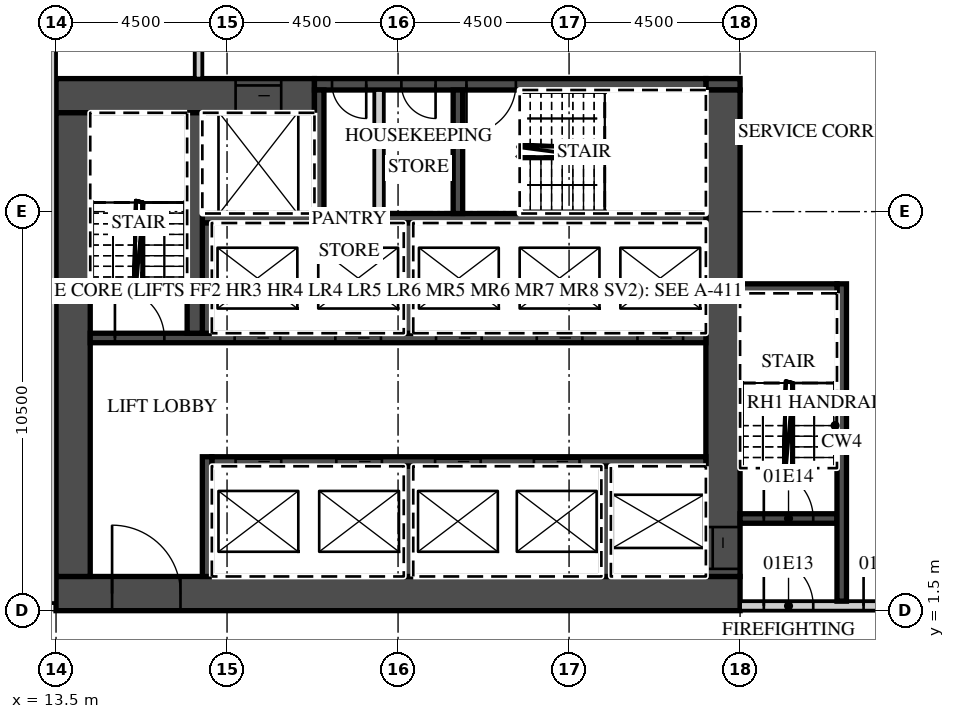
"""IFC4 building model, lengths in metres.
Left out: names, types, materials, properties, quantities, classifications, styles, units other than length and angle.
Written with IfcOpenShell. Run it as: python <this file> out.ifc"""

import sys

from ifc_helpers import new_model, si_unit, direction, frame, frame_2d, origin, place, context, subcontext, project, spatial, rectangle, extrude, element, fill, save


model = new_model("IFC4")
c1 = context("Model", 3, precision=1e-05, world=origin(), true_north=direction((0.0, 1.0)))
c2 = subcontext(c1, "Body", "Model", "MODEL_VIEW")
j1 = project(units=[si_unit("LENGTHUNIT", "METRE"), si_unit("PLANEANGLEUNIT", "RADIAN")], contexts=[c1])
p1 = place(None, origin())
s1 = spatial("IfcSite", under=j1, at=p1, CompositionType="ELEMENT")
p2 = place(p1, origin())
s2 = spatial("IfcBuilding", under=s1, at=p2, CompositionType="ELEMENT")
p3 = place(p2, frame((0.0, 0.0, 11.0)))
s3 = spatial("IfcBuildingStorey", under=s2, at=p3, CompositionType="ELEMENT", Elevation=11.0)
p4 = place(p3, frame((13.5, 1.95, 0.0), z_axis=(0.0, 0.0, 1.0), x_axis=(1.0, 0.0, 0.0)))
e1 = element("IfcWall", 1, at=p4, inside=s3, PredefinedType="SHEAR", context=c2, shape_type="SweptSolid", body=[
    extrude(rectangle(XDim=18.0, YDim=0.9, at=frame_2d((9.0, 0.0))), origin(), (0.0, 0.0, 1.0), 5.55),
])
p5 = place(p4, frame((1.475, 0.0, 0.0)))
e2 = element("IfcOpeningElement", 2, at=p5, cuts=e1, PredefinedType="OPENING", context=c2, shape_type="SweptSolid", body=[
    extrude(rectangle(XDim=1.8, YDim=2.1, at=frame_2d((0.9, 1.05))), frame((0.0, 0.46, 0.0), z_axis=(0.0, -1.0, 0.0), x_axis=(1.0, 0.0, 0.0)), (0.0, 0.0, 1.0), 0.92),
])
p6 = place(p3, frame((13.5, 15.05, 0.0), z_axis=(0.0, 0.0, 1.0), x_axis=(1.0, 0.0, 0.0)))
e3 = element("IfcWall", 3, at=p6, inside=s3, PredefinedType="SHEAR", context=c2, shape_type="SweptSolid", body=[
    extrude(rectangle(XDim=6.8, YDim=0.9, at=frame_2d((3.4, 0.0))), origin(), (0.0, 0.0, 1.0), 5.55),
])
p7 = place(p6, frame((4.725, 0.0, 0.0)))
e4 = element("IfcOpeningElement", 4, at=p7, cuts=e3, PredefinedType="OPENING", context=c2, shape_type="SweptSolid", body=[
    extrude(rectangle(XDim=1.2, YDim=2.1, at=frame_2d((0.6, 1.05))), frame((0.0, 0.46, 0.0), z_axis=(0.0, -1.0, 0.0), x_axis=(1.0, 0.0, 0.0)), (0.0, 0.0, 1.0), 0.92),
])
p8 = place(p3, frame((30.6, 15.35, 0.0), z_axis=(0.0, 0.0, 1.0), x_axis=(1.0, 0.0, 0.0)))
e5 = element("IfcWall", 5, at=p8, inside=s3, PredefinedType="SHEAR", context=c2, shape_type="SweptSolid", body=[
    extrude(rectangle(XDim=0.9, YDim=0.3, at=frame_2d((0.45, 0.0))), origin(), (0.0, 0.0, 1.0), 5.55),
])
p9 = place(p3, frame((20.3, 15.35, 0.0), z_axis=(0.0, 0.0, 1.0), x_axis=(1.0, 0.0, 0.0)))
e6 = element("IfcWall", 6, at=p9, inside=s3, PredefinedType="SHEAR", context=c2, shape_type="SweptSolid", body=[
    extrude(rectangle(XDim=10.3, YDim=0.3, at=frame_2d((5.15, 0.0))), origin(), (0.0, 0.0, 1.0), 5.55),
])
p10 = place(p9, frame((4.0, 0.0, 0.0)))
e7 = element("IfcOpeningElement", 7, at=p10, cuts=e6, PredefinedType="OPENING", context=c2, shape_type="SweptSolid", body=[
    extrude(rectangle(XDim=1.3, YDim=2.1, at=frame_2d((0.65, 1.05))), frame((0.0, 0.16, 0.0), z_axis=(0.0, -1.0, 0.0), x_axis=(1.0, 0.0, 0.0)), (0.0, 0.0, 1.0), 0.32),
])
p11 = place(p9, frame((2.288, 0.0, 0.0)))
e8 = element("IfcOpeningElement", 8, at=p11, cuts=e6, PredefinedType="OPENING", context=c2, shape_type="SweptSolid", body=[
    extrude(rectangle(XDim=0.9, YDim=2.1, at=frame_2d((0.45, 1.05))), frame((0.0, 0.16, 0.0), z_axis=(0.0, -1.0, 0.0), x_axis=(1.0, 0.0, 0.0)), (0.0, 0.0, 1.0), 0.32),
])
p12 = place(p9, frame((0.462, 0.0, 0.0)))
e9 = element("IfcOpeningElement", 9, at=p12, cuts=e6, PredefinedType="OPENING", context=c2, shape_type="SweptSolid", body=[
    extrude(rectangle(XDim=0.9, YDim=2.1, at=frame_2d((0.45, 1.05))), frame((0.0, 0.16, 0.0), z_axis=(0.0, -1.0, 0.0), x_axis=(1.0, 0.0, 0.0)), (0.0, 0.0, 1.0), 0.32),
])
p13 = place(p3, frame((31.05, 2.4, 0.0), z_axis=(0.0, 0.0, 1.0), x_axis=(0.0, 1.0, 0.0)))
e10 = element("IfcWall", 10, at=p13, inside=s3, PredefinedType="SHEAR", context=c2, shape_type="SweptSolid", body=[
    extrude(rectangle(XDim=12.8, YDim=0.9, at=frame_2d((6.4, 0.0))), origin(), (0.0, 0.0, 1.0), 5.55),
])
p14 = place(p13, frame((0.2, 0.0, 0.0)))
e11 = element("IfcOpeningElement", 11, at=p14, cuts=e10, PredefinedType="OPENING", context=c2, shape_type="SweptSolid", body=[
    extrude(rectangle(XDim=1.1, YDim=2.1, at=frame_2d((0.55, 1.05))), frame((0.0, 0.46, 0.0), z_axis=(0.0, -1.0, 0.0), x_axis=(1.0, 0.0, 0.0)), (0.0, 0.0, 1.0), 0.92),
])
p15 = place(p3, frame((13.95, 2.4, 0.0), z_axis=(0.0, 0.0, 1.0), x_axis=(0.0, 1.0, 0.0)))
e12 = element("IfcWall", 12, at=p15, inside=s3, PredefinedType="SHEAR", context=c2, shape_type="SweptSolid", body=[
    extrude(rectangle(XDim=12.2, YDim=0.9, at=frame_2d((6.1, 0.0))), origin(), (0.0, 0.0, 1.0), 5.55),
])
p16 = place(p3, frame((17.6, 5.425, 0.0), z_axis=(0.0, 0.0, 1.0), x_axis=(1.0, 0.0, 0.0)))
e13 = element("IfcWall", 13, at=p16, inside=s3, PredefinedType="SHEAR", context=c2, shape_type="SweptSolid", body=[
    extrude(rectangle(XDim=13.0, YDim=0.25, at=frame_2d((6.5, 0.0))), origin(), (0.0, 0.0, 1.0), 5.55),
])
p17 = place(p16, frame((8.475, 0.0, 0.0)))
e14 = element("IfcOpeningElement", 14, at=p17, cuts=e13, PredefinedType="OPENING", context=c2, shape_type="SweptSolid", body=[
    extrude(rectangle(XDim=1.2, YDim=2.1, at=frame_2d((0.6, 1.05))), frame((0.0, 0.135, 0.0), z_axis=(0.0, -1.0, 0.0), x_axis=(1.0, 0.0, 0.0)), (0.0, 0.0, 1.0), 0.27),
])
p18 = place(p16, frame((5.875, 0.0, 0.0)))
e15 = element("IfcOpeningElement", 15, at=p18, cuts=e13, PredefinedType="OPENING", context=c2, shape_type="SweptSolid", body=[
    extrude(rectangle(XDim=1.2, YDim=2.1, at=frame_2d((0.6, 1.05))), frame((0.0, 0.135, 0.0), z_axis=(0.0, -1.0, 0.0), x_axis=(1.0, 0.0, 0.0)), (0.0, 0.0, 1.0), 0.27),
])
p19 = place(p16, frame((3.275, 0.0, 0.0)))
e16 = element("IfcOpeningElement", 16, at=p19, cuts=e13, PredefinedType="OPENING", context=c2, shape_type="SweptSolid", body=[
    extrude(rectangle(XDim=1.2, YDim=2.1, at=frame_2d((0.6, 1.05))), frame((0.0, 0.135, 0.0), z_axis=(0.0, -1.0, 0.0), x_axis=(1.0, 0.0, 0.0)), (0.0, 0.0, 1.0), 0.27),
])
p20 = place(p16, frame((0.625, 0.0, 0.0)))
e17 = element("IfcOpeningElement", 17, at=p20, cuts=e13, PredefinedType="OPENING", context=c2, shape_type="SweptSolid", body=[
    extrude(rectangle(XDim=1.2, YDim=2.1, at=frame_2d((0.6, 1.05))), frame((0.0, 0.135, 0.0), z_axis=(0.0, -1.0, 0.0), x_axis=(1.0, 0.0, 0.0)), (0.0, 0.0, 1.0), 0.27),
])
p21 = place(p3, frame((17.475, 2.4, 0.0), z_axis=(0.0, 0.0, 1.0), x_axis=(0.0, 1.0, 0.0)))
e18 = element("IfcWall", 18, at=p21, inside=s3, PredefinedType="SHEAR", context=c2, shape_type="SweptSolid", body=[
    extrude(rectangle(XDim=3.15, YDim=0.25, at=frame_2d((1.575, 0.0))), origin(), (0.0, 0.0, 1.0), 5.55),
])
for number, where, z_axis, x_axis in (
    (19, (27.975, 2.4, 0.0), (0.0, 0.0, 1.0), (0.0, 1.0, 0.0)),
    (20, (22.775, 2.4, 0.0), (0.0, 0.0, 1.0), (0.0, 1.0, 0.0)),
):
    element("IfcWall", number, at=place(p3, frame(where, z_axis=z_axis, x_axis=x_axis)), inside=s3, PredefinedType="SHEAR", context=c2, shape_type="SweptSolid", body=[
        extrude(rectangle(XDim=2.9, YDim=0.25, at=frame_2d((1.45, 0.0))), origin(), (0.0, 0.0, 1.0), 5.55),
    ])
p22 = place(p3, frame((14.4, 8.675, 0.0), z_axis=(0.0, 0.0, 1.0), x_axis=(1.0, 0.0, 0.0)))
e21 = element("IfcWall", 21, at=p22, inside=s3, PredefinedType="SHEAR", context=c2, shape_type="SweptSolid", body=[
    extrude(rectangle(XDim=16.2, YDim=0.25, at=frame_2d((8.1, 0.0))), origin(), (0.0, 0.0, 1.0), 5.55),
])
p23 = place(p22, frame((14.4, 0.0, 0.0)))
e22 = element("IfcOpeningElement", 22, at=p23, cuts=e21, PredefinedType="OPENING", context=c2, shape_type="SweptSolid", body=[
    extrude(rectangle(XDim=1.2, YDim=2.1, at=frame_2d((0.6, 1.05))), frame((0.0, 0.135, 0.0), z_axis=(0.0, -1.0, 0.0), x_axis=(1.0, 0.0, 0.0)), (0.0, 0.0, 1.0), 0.27),
])
p24 = place(p22, frame((11.75, 0.0, 0.0)))
e23 = element("IfcOpeningElement", 23, at=p24, cuts=e21, PredefinedType="OPENING", context=c2, shape_type="SweptSolid", body=[
    extrude(rectangle(XDim=1.2, YDim=2.1, at=frame_2d((0.6, 1.05))), frame((0.0, 0.135, 0.0), z_axis=(0.0, -1.0, 0.0), x_axis=(1.0, 0.0, 0.0)), (0.0, 0.0, 1.0), 0.27),
])
p25 = place(p22, frame((9.1, 0.0, 0.0)))
e24 = element("IfcOpeningElement", 24, at=p25, cuts=e21, PredefinedType="OPENING", context=c2, shape_type="SweptSolid", body=[
    extrude(rectangle(XDim=1.2, YDim=2.1, at=frame_2d((0.6, 1.05))), frame((0.0, 0.135, 0.0), z_axis=(0.0, -1.0, 0.0), x_axis=(1.0, 0.0, 0.0)), (0.0, 0.0, 1.0), 0.27),
])
p26 = place(p22, frame((6.45, 0.0, 0.0)))
e25 = element("IfcOpeningElement", 25, at=p26, cuts=e21, PredefinedType="OPENING", context=c2, shape_type="SweptSolid", body=[
    extrude(rectangle(XDim=1.2, YDim=2.1, at=frame_2d((0.6, 1.05))), frame((0.0, 0.135, 0.0), z_axis=(0.0, -1.0, 0.0), x_axis=(1.0, 0.0, 0.0)), (0.0, 0.0, 1.0), 0.27),
])
p27 = place(p22, frame((3.8, 0.0, 0.0)))
e26 = element("IfcOpeningElement", 26, at=p27, cuts=e21, PredefinedType="OPENING", context=c2, shape_type="SweptSolid", body=[
    extrude(rectangle(XDim=1.2, YDim=2.1, at=frame_2d((0.6, 1.05))), frame((0.0, 0.135, 0.0), z_axis=(0.0, -1.0, 0.0), x_axis=(1.0, 0.0, 0.0)), (0.0, 0.0, 1.0), 0.27),
])
p28 = place(p22, frame((0.65, 0.0, 0.0)))
e27 = element("IfcOpeningElement", 27, at=p28, cuts=e21, PredefinedType="OPENING", context=c2, shape_type="SweptSolid", body=[
    extrude(rectangle(XDim=1.3, YDim=2.1, at=frame_2d((0.65, 1.05))), frame((0.0, 0.135, 0.0), z_axis=(0.0, -1.0, 0.0), x_axis=(1.0, 0.0, 0.0)), (0.0, 0.0, 1.0), 0.27),
])
p29 = place(p3, frame((17.35, 11.825, 0.0), z_axis=(0.0, 0.0, 1.0), x_axis=(1.0, 0.0, 0.0)))
e28 = element("IfcWall", 28, at=p29, inside=s3, PredefinedType="SHEAR", context=c2, shape_type="SweptSolid", body=[
    extrude(rectangle(XDim=13.25, YDim=0.25, at=frame_2d((6.625, 0.0))), origin(), (0.0, 0.0, 1.0), 5.55),
])
for number, where, z_axis, x_axis in (
    (29, (17.475, 8.8, 0.0), (0.0, 0.0, 1.0), (0.0, 1.0, 0.0)),
    (30, (22.775, 8.8, 0.0), (0.0, 0.0, 1.0), (0.0, 1.0, 0.0)),
):
    element("IfcWall", number, at=place(p3, frame(where, z_axis=z_axis, x_axis=x_axis)), inside=s3, PredefinedType="SHEAR", context=c2, shape_type="SweptSolid", body=[
        extrude(rectangle(XDim=2.9, YDim=0.25, at=frame_2d((1.45, 0.0))), origin(), (0.0, 0.0, 1.0), 5.55),
    ])
p30 = place(p3, frame((17.15, 8.8, 0.0), z_axis=(0.0, 0.0, 1.0), x_axis=(0.0, 1.0, 0.0)))
e31 = element("IfcWall", 31, at=p30, inside=s3, PredefinedType="SHEAR", context=c2, shape_type="SweptSolid", body=[
    extrude(rectangle(XDim=5.8, YDim=0.4, at=frame_2d((2.9, 0.0))), origin(), (0.0, 0.0, 1.0), 5.55),
])
for number, where, z_axis, x_axis in (
    (32, (20.425, 11.95, 0.0), (0.0, 0.0, 1.0), (0.0, 1.0, 0.0)),
    (33, (24.075, 11.95, 0.0), (0.0, 0.0, 1.0), (0.0, 1.0, 0.0)),
):
    element("IfcWall", number, at=place(p3, frame(where, z_axis=z_axis, x_axis=x_axis)), inside=s3, PredefinedType="SHEAR", context=c2, shape_type="SweptSolid", body=[
        extrude(rectangle(XDim=3.25, YDim=0.25, at=frame_2d((1.625, 0.0))), origin(), (0.0, 0.0, 1.0), 5.55),
    ])
p31 = place(p3, frame((22.0, 11.95, 0.0), z_axis=(0.0, 0.0, 1.0), x_axis=(0.0, 1.0, 0.0)))
e34 = element("IfcWall", 34, at=p31, inside=s3, PredefinedType="PARTITIONING", context=c2, shape_type="SweptSolid", body=[
    extrude(rectangle(XDim=3.25, YDim=0.25, at=frame_2d((1.625, 0.0))), origin(), (0.0, 0.0, 1.0), 5.55),
])
p32 = place(p3, frame((31.5, 1.625, 0.0), z_axis=(0.0, 0.0, 1.0), x_axis=(1.0, 0.0, 0.0)))
e35 = element("IfcWall", 35, at=p32, inside=s3, PredefinedType="PARTITIONING", context=c2, shape_type="SweptSolid", body=[
    extrude(rectangle(XDim=13.35, YDim=0.25, at=frame_2d((6.675, 0.0))), origin(), (0.0, 0.0, 1.0), 5.55),
])
p33 = place(p32, frame((0.625, 0.0, 0.0)))
e36 = element("IfcOpeningElement", 36, at=p33, cuts=e35, PredefinedType="OPENING", context=c2, shape_type="SweptSolid", body=[
    extrude(rectangle(XDim=1.3, YDim=2.1, at=frame_2d((0.65, 1.05))), frame((0.0, 0.135, 0.0), z_axis=(0.0, -1.0, 0.0), x_axis=(1.0, 0.0, 0.0)), (0.0, 0.0, 1.0), 0.27),
])
p34 = place(p32, frame((3.25, 0.0, 0.0)))
e37 = element("IfcOpeningElement", 37, at=p34, cuts=e35, PredefinedType="OPENING", context=c2, shape_type="SweptSolid", body=[
    extrude(rectangle(XDim=1.1, YDim=2.1, at=frame_2d((0.55, 1.05))), frame((0.0, 0.135, 0.0), z_axis=(0.0, -1.0, 0.0), x_axis=(1.0, 0.0, 0.0)), (0.0, 0.0, 1.0), 0.27),
])
p35 = place(p3, frame((31.5, 3.925, 0.0), z_axis=(0.0, 0.0, 1.0), x_axis=(1.0, 0.0, 0.0)))
e38 = element("IfcWall", 38, at=p35, inside=s3, PredefinedType="SHEAR", context=c2, shape_type="SweptSolid", body=[
    extrude(rectangle(XDim=2.55, YDim=0.25, at=frame_2d((1.275, 0.0))), origin(), (0.0, 0.0, 1.0), 5.55),
])
p36 = place(p35, frame((0.625, 0.0, 0.0)))
e39 = element("IfcOpeningElement", 39, at=p36, cuts=e38, PredefinedType="OPENING", context=c2, shape_type="SweptSolid", body=[
    extrude(rectangle(XDim=1.3, YDim=2.1, at=frame_2d((0.65, 1.05))), frame((0.0, 0.135, 0.0), z_axis=(0.0, -1.0, 0.0), x_axis=(1.0, 0.0, 0.0)), (0.0, 0.0, 1.0), 0.27),
])
p37 = place(p3, frame((34.175, 1.75, 0.0), z_axis=(0.0, 0.0, 1.0), x_axis=(0.0, 1.0, 0.0)))
e40 = element("IfcWall", 40, at=p37, inside=s3, PredefinedType="SHEAR", context=c2, shape_type="SweptSolid", body=[
    extrude(rectangle(XDim=8.35, YDim=0.25, at=frame_2d((4.175, 0.0))), origin(), (0.0, 0.0, 1.0), 5.55),
])
p38 = place(p3, frame((31.5, 9.975, 0.0), z_axis=(0.0, 0.0, 1.0), x_axis=(1.0, 0.0, 0.0)))
e41 = element("IfcWall", 41, at=p38, inside=s3, PredefinedType="SHEAR", context=c2, shape_type="SweptSolid", body=[
    extrude(rectangle(XDim=2.55, YDim=0.25, at=frame_2d((1.275, 0.0))), origin(), (0.0, 0.0, 1.0), 5.55),
])
p39 = place(p3, frame((17.25, 15.5, 0.0), z_axis=(0.0, 0.0, 1.0), x_axis=(0.0, 1.0, 0.0)))
e42 = element("IfcWall", 42, at=p39, inside=s3, PredefinedType="PARTITIONING", context=c2, shape_type="SweptSolid", body=[
    extrude(rectangle(XDim=2.2, YDim=0.2, at=frame_2d((1.1, 0.0))), origin(), (0.0, 0.0, 1.0), 5.55),
])
p40 = place(p3, frame((13.4, 1.7, 0.0), z_axis=(0.0, 0.0, 1.0), x_axis=(0.0, 1.0, 0.0)))
e43 = element("IfcWall", 43, at=p40, inside=s3, PredefinedType="PARTITIONING", context=c2, shape_type="SweptSolid", body=[
    extrude(rectangle(XDim=20.15, YDim=0.2, at=frame_2d((10.075, 0.0))), origin(), (0.0, 0.0, 1.0), 5.55),
])
p41 = place(p23, origin())
e44 = element("IfcDoor", 44, at=p41, inside=s3, OperationType="SLIDING_TO_LEFT", PredefinedType="DOOR", context=c2, shape_type="SweptSolid", body=[
    extrude(rectangle(XDim=1.2, YDim=2.1, at=frame_2d((0.6, 1.05))), frame((0.0, 0.025, 0.0), z_axis=(0.0, -1.0, 0.0), x_axis=(1.0, 0.0, 0.0)), (0.0, 0.0, 1.0), 0.05),
])
fill(e22, e44)
p42 = place(p24, origin())
e45 = element("IfcDoor", 45, at=p42, inside=s3, OperationType="SLIDING_TO_RIGHT", PredefinedType="DOOR", context=c2, shape_type="SweptSolid", body=[
    extrude(rectangle(XDim=1.2, YDim=2.1, at=frame_2d((0.6, 1.05))), frame((0.0, 0.025, 0.0), z_axis=(0.0, -1.0, 0.0), x_axis=(1.0, 0.0, 0.0)), (0.0, 0.0, 1.0), 0.05),
])
fill(e23, e45)
p43 = place(p25, origin())
e46 = element("IfcDoor", 46, at=p43, inside=s3, OperationType="SLIDING_TO_RIGHT", PredefinedType="DOOR", context=c2, shape_type="SweptSolid", body=[
    extrude(rectangle(XDim=1.2, YDim=2.1, at=frame_2d((0.6, 1.05))), frame((0.0, 0.025, 0.0), z_axis=(0.0, -1.0, 0.0), x_axis=(1.0, 0.0, 0.0)), (0.0, 0.0, 1.0), 0.05),
])
fill(e24, e46)
p44 = place(p26, origin())
e47 = element("IfcDoor", 47, at=p44, inside=s3, OperationType="SLIDING_TO_LEFT", PredefinedType="DOOR", context=c2, shape_type="SweptSolid", body=[
    extrude(rectangle(XDim=1.2, YDim=2.1, at=frame_2d((0.6, 1.05))), frame((0.0, 0.025, 0.0), z_axis=(0.0, -1.0, 0.0), x_axis=(1.0, 0.0, 0.0)), (0.0, 0.0, 1.0), 0.05),
])
fill(e25, e47)
p45 = place(p27, origin())
e48 = element("IfcDoor", 48, at=p45, inside=s3, OperationType="SLIDING_TO_RIGHT", PredefinedType="DOOR", context=c2, shape_type="SweptSolid", body=[
    extrude(rectangle(XDim=1.2, YDim=2.1, at=frame_2d((0.6, 1.05))), frame((0.0, 0.025, 0.0), z_axis=(0.0, -1.0, 0.0), x_axis=(1.0, 0.0, 0.0)), (0.0, 0.0, 1.0), 0.05),
])
fill(e26, e48)
p46 = place(p17, origin())
e49 = element("IfcDoor", 49, at=p46, inside=s3, OperationType="SLIDING_TO_LEFT", PredefinedType="DOOR", context=c2, shape_type="SweptSolid", body=[
    extrude(rectangle(XDim=1.2, YDim=2.1, at=frame_2d((0.6, 1.05))), frame((0.0, 0.025, 0.0), z_axis=(0.0, -1.0, 0.0), x_axis=(1.0, 0.0, 0.0)), (0.0, 0.0, 1.0), 0.05),
])
fill(e14, e49)
p47 = place(p18, origin())
e50 = element("IfcDoor", 50, at=p47, inside=s3, OperationType="SLIDING_TO_RIGHT", PredefinedType="DOOR", context=c2, shape_type="SweptSolid", body=[
    extrude(rectangle(XDim=1.2, YDim=2.1, at=frame_2d((0.6, 1.05))), frame((0.0, 0.025, 0.0), z_axis=(0.0, -1.0, 0.0), x_axis=(1.0, 0.0, 0.0)), (0.0, 0.0, 1.0), 0.05),
])
fill(e15, e50)
p48 = place(p19, origin())
e51 = element("IfcDoor", 51, at=p48, inside=s3, OperationType="SLIDING_TO_RIGHT", PredefinedType="DOOR", context=c2, shape_type="SweptSolid", body=[
    extrude(rectangle(XDim=1.2, YDim=2.1, at=frame_2d((0.6, 1.05))), frame((0.0, 0.025, 0.0), z_axis=(0.0, -1.0, 0.0), x_axis=(1.0, 0.0, 0.0)), (0.0, 0.0, 1.0), 0.05),
])
fill(e16, e51)
p49 = place(p20, origin())
e52 = element("IfcDoor", 52, at=p49, inside=s3, OperationType="SLIDING_TO_LEFT", PredefinedType="DOOR", context=c2, shape_type="SweptSolid", body=[
    extrude(rectangle(XDim=1.2, YDim=2.1, at=frame_2d((0.6, 1.05))), frame((0.0, 0.025, 0.0), z_axis=(0.0, -1.0, 0.0), x_axis=(1.0, 0.0, 0.0)), (0.0, 0.0, 1.0), 0.05),
])
fill(e17, e52)
p50 = place(p7, origin())
e53 = element("IfcDoor", 53, at=p50, inside=s3, OperationType="SLIDING_TO_LEFT", PredefinedType="DOOR", context=c2, shape_type="SweptSolid", body=[
    extrude(rectangle(XDim=1.2, YDim=2.1, at=frame_2d((0.6, 1.05))), frame((0.0, 0.025, 0.0), z_axis=(0.0, -1.0, 0.0), x_axis=(1.0, 0.0, 0.0)), (0.0, 0.0, 1.0), 0.05),
])
fill(e4, e53)
p51 = place(p14, origin())
e54 = element("IfcDoor", 54, at=p51, inside=s3, OperationType="SLIDING_TO_LEFT", PredefinedType="DOOR", context=c2, shape_type="SweptSolid", body=[
    extrude(rectangle(XDim=1.1, YDim=2.1, at=frame_2d((0.55, 1.05))), frame((0.0, 0.025, 0.0), z_axis=(0.0, -1.0, 0.0), x_axis=(1.0, 0.0, 0.0)), (0.0, 0.0, 1.0), 0.05),
])
fill(e11, e54)
p52 = place(p5, origin())
e55 = element("IfcDoor", 55, at=p52, inside=s3, OperationType="DOUBLE_DOOR_DOUBLE_SWING", PredefinedType="DOOR", context=c2, shape_type="SweptSolid", body=[
    extrude(rectangle(XDim=1.8, YDim=2.1, at=frame_2d((0.9, 1.05))), frame((0.0, 0.025, 0.0), z_axis=(0.0, -1.0, 0.0), x_axis=(1.0, 0.0, 0.0)), (0.0, 0.0, 1.0), 0.05),
])
fill(e2, e55)
p53 = place(p33, origin())
e56 = element("IfcDoor", 56, at=p53, inside=s3, OperationType="SINGLE_SWING_LEFT", PredefinedType="DOOR", context=c2, shape_type="SweptSolid", body=[
    extrude(rectangle(XDim=1.3, YDim=2.1, at=frame_2d((0.65, 1.05))), frame((0.0, 0.025, 0.0), z_axis=(0.0, -1.0, 0.0), x_axis=(1.0, 0.0, 0.0)), (0.0, 0.0, 1.0), 0.05),
])
fill(e36, e56)
p54 = place(p36, origin())
e57 = element("IfcDoor", 57, at=p54, inside=s3, OperationType="SINGLE_SWING_LEFT", PredefinedType="DOOR", context=c2, shape_type="SweptSolid", body=[
    extrude(rectangle(XDim=1.3, YDim=2.1, at=frame_2d((0.65, 1.05))), frame((0.0, 0.025, 0.0), z_axis=(0.0, -1.0, 0.0), x_axis=(1.0, 0.0, 0.0)), (0.0, 0.0, 1.0), 0.05),
])
fill(e39, e57)
p55 = place(p34, origin())
e58 = element("IfcDoor", 58, at=p55, inside=s3, OperationType="SINGLE_SWING_LEFT", PredefinedType="DOOR", context=c2, shape_type="SweptSolid", body=[
    extrude(rectangle(XDim=1.1, YDim=2.1, at=frame_2d((0.55, 1.05))), frame((0.0, 0.025, 0.0), z_axis=(0.0, -1.0, 0.0), x_axis=(1.0, 0.0, 0.0)), (0.0, 0.0, 1.0), 0.05),
])
fill(e37, e58)
p56 = place(p28, origin())
e59 = element("IfcDoor", 59, at=p56, inside=s3, OperationType="SINGLE_SWING_LEFT", PredefinedType="DOOR", context=c2, shape_type="SweptSolid", body=[
    extrude(rectangle(XDim=1.3, YDim=2.1, at=frame_2d((0.65, 1.05))), frame((0.0, 0.025, 0.0), z_axis=(0.0, -1.0, 0.0), x_axis=(1.0, 0.0, 0.0)), (0.0, 0.0, 1.0), 0.05),
])
fill(e27, e59)
p57 = place(p10, origin())
e60 = element("IfcDoor", 60, at=p57, inside=s3, OperationType="SINGLE_SWING_LEFT", PredefinedType="DOOR", context=c2, shape_type="SweptSolid", body=[
    extrude(rectangle(XDim=1.3, YDim=2.1, at=frame_2d((0.65, 1.05))), frame((0.0, 0.025, 0.0), z_axis=(0.0, -1.0, 0.0), x_axis=(1.0, 0.0, 0.0)), (0.0, 0.0, 1.0), 0.05),
])
fill(e7, e60)
p58 = place(p11, origin())
e61 = element("IfcDoor", 61, at=p58, inside=s3, OperationType="SINGLE_SWING_RIGHT", PredefinedType="DOOR", context=c2, shape_type="SweptSolid", body=[
    extrude(rectangle(XDim=0.9, YDim=2.1, at=frame_2d((0.45, 1.05))), frame((0.0, 0.025, 0.0), z_axis=(0.0, -1.0, 0.0), x_axis=(1.0, 0.0, 0.0)), (0.0, 0.0, 1.0), 0.05),
])
fill(e8, e61)
p59 = place(p12, origin())
e62 = element("IfcDoor", 62, at=p59, inside=s3, OperationType="SINGLE_SWING_RIGHT", PredefinedType="DOOR", context=c2, shape_type="SweptSolid", body=[
    extrude(rectangle(XDim=0.9, YDim=2.1, at=frame_2d((0.45, 1.05))), frame((0.0, 0.025, 0.0), z_axis=(0.0, -1.0, 0.0), x_axis=(1.0, 0.0, 0.0)), (0.0, 0.0, 1.0), 0.05),
])
fill(e9, e62)
save(model, sys.argv[1])
